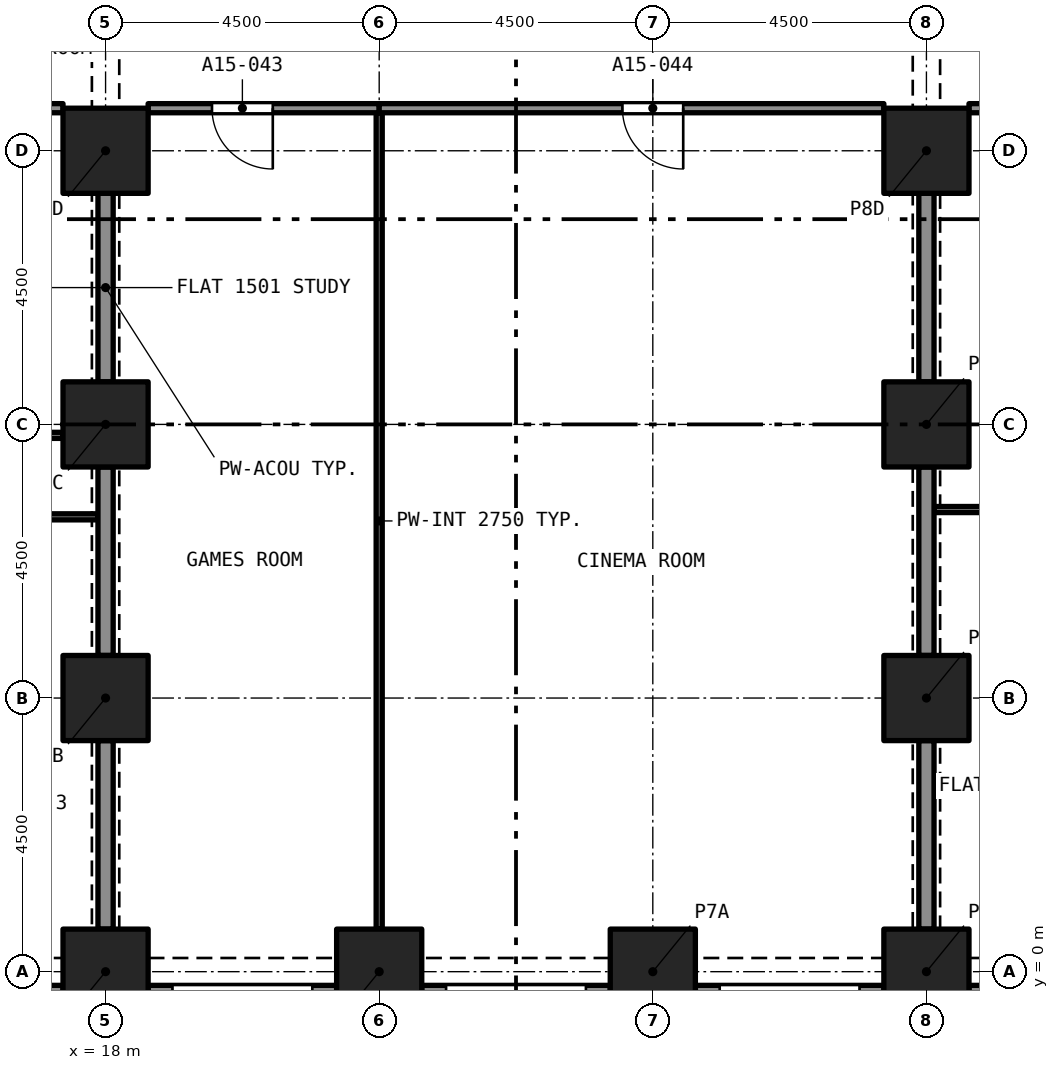
"""IFC4 building model, lengths in metres.
Left out: names, types, materials, properties, quantities, classifications, styles, units other than length and angle.
Written with IfcOpenShell. Run it as: python <this file> out.ifc"""

import sys

from ifc_helpers import new_model, si_unit, direction, frame, frame_2d, origin, origin_2d, place, context, subcontext, project, spatial, rectangle, extrude, element, fill, save


model = new_model("IFC4")
c1 = context("Model", 3, precision=1e-05, world=origin(), true_north=direction((0.0, 1.0)))
c2 = subcontext(c1, "Body", "Model", "MODEL_VIEW")
j1 = project(units=[si_unit("LENGTHUNIT", "METRE"), si_unit("PLANEANGLEUNIT", "RADIAN")], contexts=[c1])
p1 = place(None, origin())
s1 = spatial("IfcSite", under=j1, at=p1, CompositionType="ELEMENT")
p2 = place(p1, origin())
s2 = spatial("IfcBuilding", under=s1, at=p2, CompositionType="ELEMENT")
p3 = place(p2, frame((0.0, 0.0, 59.2)))
s3 = spatial("IfcBuildingStorey", under=s2, at=p3, CompositionType="ELEMENT", Elevation=59.2)
for number, where, z_axis, x_axis in (
    (1, (18.0, 0.0, 0.0), (0.0, 0.0, 1.0), (1.0, 0.0, 0.0)),
    (2, (22.5, 0.0, 0.0), (0.0, 0.0, 1.0), (1.0, 0.0, 0.0)),
    (3, (27.0, 0.0, 0.0), (0.0, 0.0, 1.0), (1.0, 0.0, 0.0)),
    (4, (31.5, 0.0, 0.0), (0.0, 0.0, 1.0), (1.0, 0.0, 0.0)),
    (5, (18.0, 4.5, 0.0), (0.0, 0.0, 1.0), (1.0, 0.0, 0.0)),
    (6, (31.5, 4.5, 0.0), (0.0, 0.0, 1.0), (1.0, 0.0, 0.0)),
    (7, (18.0, 9.0, 0.0), (0.0, 0.0, 1.0), (1.0, 0.0, 0.0)),
    (8, (31.5, 9.0, 0.0), (0.0, 0.0, 1.0), (1.0, 0.0, 0.0)),
    (9, (18.0, 13.5, 0.0), (0.0, 0.0, 1.0), (1.0, 0.0, 0.0)),
    (10, (31.5, 13.5, 0.0), (0.0, 0.0, 1.0), (1.0, 0.0, 0.0)),
):
    element("IfcColumn", number, at=place(p3, frame(where, z_axis=z_axis, x_axis=x_axis)), inside=s3, PredefinedType="COLUMN", context=c2, shape_type="SweptSolid", body=[
        extrude(rectangle(XDim=1.4, YDim=1.4, at=origin_2d()), origin(), (0.0, 0.0, 1.0), 3.2),
    ])
p4 = place(p3, frame((17.3, -0.375, 0.0), z_axis=(0.0, 0.0, 1.0), x_axis=(-1.0, 0.0, 0.0)))
e11 = element("IfcWall", 11, at=p4, inside=s3, PredefinedType="SOLIDWALL", context=c2, shape_type="SweptSolid", body=[
    extrude(rectangle(XDim=3.1, YDim=0.3, at=frame_2d((1.55, 0.0))), origin(), (0.0, 0.0, 1.0), 3.2),
])
p5 = place(p4, frame((0.4, 0.0, 0.45)))
e12 = element("IfcOpeningElement", 12, at=p5, cuts=e11, PredefinedType="OPENING", context=c2, shape_type="SweptSolid", body=[
    extrude(rectangle(XDim=2.3, YDim=1.95, at=frame_2d((1.15, 0.975))), frame((0.0, 0.16, 0.0), z_axis=(0.0, -1.0, 0.0), x_axis=(1.0, 0.0, 0.0)), (0.0, 0.0, 1.0), 0.32),
])
p6 = place(p3, frame((21.8, -0.375, 0.0), z_axis=(0.0, 0.0, 1.0), x_axis=(-1.0, 0.0, 0.0)))
e13 = element("IfcWall", 13, at=p6, inside=s3, PredefinedType="SOLIDWALL", context=c2, shape_type="SweptSolid", body=[
    extrude(rectangle(XDim=3.1, YDim=0.3, at=frame_2d((1.55, 0.0))), origin(), (0.0, 0.0, 1.0), 3.2),
])
p7 = place(p6, frame((0.4, 0.0, 0.45)))
e14 = element("IfcOpeningElement", 14, at=p7, cuts=e13, PredefinedType="OPENING", context=c2, shape_type="SweptSolid", body=[
    extrude(rectangle(XDim=2.3, YDim=1.95, at=frame_2d((1.15, 0.975))), frame((0.0, 0.16, 0.0), z_axis=(0.0, -1.0, 0.0), x_axis=(1.0, 0.0, 0.0)), (0.0, 0.0, 1.0), 0.32),
])
p8 = place(p3, frame((26.3, -0.375, 0.0), z_axis=(0.0, 0.0, 1.0), x_axis=(-1.0, 0.0, 0.0)))
e15 = element("IfcWall", 15, at=p8, inside=s3, PredefinedType="SOLIDWALL", context=c2, shape_type="SweptSolid", body=[
    extrude(rectangle(XDim=3.1, YDim=0.3, at=frame_2d((1.55, 0.0))), origin(), (0.0, 0.0, 1.0), 3.2),
])
p9 = place(p8, frame((0.4, 0.0, 0.45)))
e16 = element("IfcOpeningElement", 16, at=p9, cuts=e15, PredefinedType="OPENING", context=c2, shape_type="SweptSolid", body=[
    extrude(rectangle(XDim=2.3, YDim=1.95, at=frame_2d((1.15, 0.975))), frame((0.0, 0.16, 0.0), z_axis=(0.0, -1.0, 0.0), x_axis=(1.0, 0.0, 0.0)), (0.0, 0.0, 1.0), 0.32),
])
p10 = place(p3, frame((30.8, -0.375, 0.0), z_axis=(0.0, 0.0, 1.0), x_axis=(-1.0, 0.0, 0.0)))
e17 = element("IfcWall", 17, at=p10, inside=s3, PredefinedType="SOLIDWALL", context=c2, shape_type="SweptSolid", body=[
    extrude(rectangle(XDim=3.1, YDim=0.3, at=frame_2d((1.55, 0.0))), origin(), (0.0, 0.0, 1.0), 3.2),
])
p11 = place(p10, frame((0.4, 0.0, 0.45)))
e18 = element("IfcOpeningElement", 18, at=p11, cuts=e17, PredefinedType="OPENING", context=c2, shape_type="SweptSolid", body=[
    extrude(rectangle(XDim=2.3, YDim=1.95, at=frame_2d((1.15, 0.975))), frame((0.0, 0.16, 0.0), z_axis=(0.0, -1.0, 0.0), x_axis=(1.0, 0.0, 0.0)), (0.0, 0.0, 1.0), 0.32),
])
p12 = place(p3, frame((35.3, -0.375, 0.0), z_axis=(0.0, 0.0, 1.0), x_axis=(-1.0, 0.0, 0.0)))
e19 = element("IfcWall", 19, at=p12, inside=s3, PredefinedType="SOLIDWALL", context=c2, shape_type="SweptSolid", body=[
    extrude(rectangle(XDim=3.1, YDim=0.3, at=frame_2d((1.55, 0.0))), origin(), (0.0, 0.0, 1.0), 3.2),
])
p13 = place(p12, frame((0.4, 0.0, 0.45)))
e20 = element("IfcOpeningElement", 20, at=p13, cuts=e19, PredefinedType="OPENING", context=c2, shape_type="SweptSolid", body=[
    extrude(rectangle(XDim=2.3, YDim=1.95, at=frame_2d((1.15, 0.975))), frame((0.0, 0.16, 0.0), z_axis=(0.0, -1.0, 0.0), x_axis=(1.0, 0.0, 0.0)), (0.0, 0.0, 1.0), 0.32),
])
p14 = place(p3, frame((8.55, 14.2, 0.0), z_axis=(0.0, 0.0, 1.0), x_axis=(1.0, 0.0, 0.0)))
e21 = element("IfcWall", 21, at=p14, inside=s3, PredefinedType="PARTITIONING", context=c2, shape_type="SweptSolid", body=[
    extrude(rectangle(XDim=8.75, YDim=0.15, at=frame_2d((4.375, 0.0))), origin(), (0.0, 0.0, 1.0), 2.9),
])
p15 = place(p3, frame((17.875, 7.48, 0.0), z_axis=(0.0, 0.0, 1.0), x_axis=(-1.0, 0.0, 0.0)))
e22 = element("IfcWall", 22, at=p15, inside=s3, PredefinedType="PARTITIONING", context=c2, shape_type="SweptSolid", body=[
    extrude(rectangle(XDim=4.375, YDim=0.1, at=frame_2d((2.188, 0.0))), origin(), (0.0, 0.0, 1.0), 2.9),
])
p16 = place(p15, frame((1.675, 0.0, 0.0)))
e23 = element("IfcOpeningElement", 23, at=p16, cuts=e22, PredefinedType="OPENING", context=c2, shape_type="SweptSolid", body=[
    extrude(rectangle(XDim=0.9, YDim=2.1, at=frame_2d((0.45, 1.05))), frame((0.0, 0.06, 0.0), z_axis=(0.0, -1.0, 0.0), x_axis=(1.0, 0.0, 0.0)), (0.0, 0.0, 1.0), 0.12),
])
for number, where, z_axis, x_axis in (
    (24, (18.0, 5.2, 0.0), (0.0, 0.0, 1.0), (0.0, 1.0, 0.0)),
    (25, (18.0, 0.7, 0.0), (0.0, 0.0, 1.0), (0.0, 1.0, 0.0)),
):
    element("IfcWall", number, at=place(p3, frame(where, z_axis=z_axis, x_axis=x_axis)), inside=s3, PredefinedType="PARTITIONING", context=c2, shape_type="SweptSolid", body=[
        extrude(rectangle(XDim=3.1, YDim=0.25, at=frame_2d((1.55, 0.0))), origin(), (0.0, 0.0, 1.0), 2.38),
    ])
p17 = place(p3, frame((14.771, 8.82, 0.0), z_axis=(0.0, 0.0, 1.0), x_axis=(1.0, 0.0, 0.0)))
e26 = element("IfcWall", 26, at=p17, inside=s3, PredefinedType="PARTITIONING", context=c2, shape_type="SweptSolid", body=[
    extrude(rectangle(XDim=2.529, YDim=0.1, at=frame_2d((1.265, 0.0))), origin(), (0.0, 0.0, 1.0), 2.9),
])
p18 = place(p17, frame((1.165, 0.0, 0.0)))
e27 = element("IfcOpeningElement", 27, at=p18, cuts=e26, PredefinedType="OPENING", context=c2, shape_type="SweptSolid", body=[
    extrude(rectangle(XDim=0.9, YDim=2.1, at=frame_2d((0.45, 1.05))), frame((0.0, 0.06, 0.0), z_axis=(0.0, -1.0, 0.0), x_axis=(1.0, 0.0, 0.0)), (0.0, 0.0, 1.0), 0.12),
])
p19 = place(p3, frame((18.0, 9.7, 0.0), z_axis=(0.0, 0.0, 1.0), x_axis=(0.0, 1.0, 0.0)))
e28 = element("IfcWall", 28, at=p19, inside=s3, PredefinedType="PARTITIONING", context=c2, shape_type="SweptSolid", body=[
    extrude(rectangle(XDim=3.1, YDim=0.25, at=frame_2d((1.55, 0.0))), origin(), (0.0, 0.0, 1.0), 2.38),
])
p20 = place(p3, frame((36.0, 7.6, 0.0), z_axis=(0.0, 0.0, 1.0), x_axis=(-1.0, 0.0, 0.0)))
e29 = element("IfcWall", 29, at=p20, inside=s3, PredefinedType="PARTITIONING", context=c2, shape_type="SweptSolid", body=[
    extrude(rectangle(XDim=4.375, YDim=0.1, at=frame_2d((2.188, 0.0))), origin(), (0.0, 0.0, 1.0), 2.9),
])
p21 = place(p20, frame((1.75, 0.0, 0.0)))
e30 = element("IfcOpeningElement", 30, at=p21, cuts=e29, PredefinedType="OPENING", context=c2, shape_type="SweptSolid", body=[
    extrude(rectangle(XDim=1.0, YDim=2.1, at=frame_2d((0.5, 1.05))), frame((0.0, 0.06, 0.0), z_axis=(0.0, -1.0, 0.0), x_axis=(1.0, 0.0, 0.0)), (0.0, 0.0, 1.0), 0.12),
])
p22 = place(p3, frame((31.5, 9.7, 0.0), z_axis=(0.0, 0.0, 1.0), x_axis=(0.0, 1.0, 0.0)))
e31 = element("IfcWall", 31, at=p22, inside=s3, PredefinedType="PARTITIONING", context=c2, shape_type="SweptSolid", body=[
    extrude(rectangle(XDim=3.1, YDim=0.25, at=frame_2d((1.55, 0.0))), origin(), (0.0, 0.0, 1.0), 2.38),
])
p23 = place(p3, frame((34.425, 14.2, 0.0), z_axis=(0.0, 0.0, 1.0), x_axis=(-1.0, 0.0, 0.0)))
e32 = element("IfcWall", 32, at=p23, inside=s3, PredefinedType="PARTITIONING", context=c2, shape_type="SweptSolid", body=[
    extrude(rectangle(XDim=2.225, YDim=0.15, at=frame_2d((1.113, 0.0))), origin(), (0.0, 0.0, 1.0), 2.9),
])
p24 = place(p23, frame((0.175, 0.0, 0.0)))
e33 = element("IfcOpeningElement", 33, at=p24, cuts=e32, PredefinedType="OPENING", context=c2, shape_type="SweptSolid", body=[
    extrude(rectangle(XDim=1.0, YDim=2.1, at=frame_2d((0.5, 1.05))), frame((0.0, 0.085, 0.0), z_axis=(0.0, -1.0, 0.0), x_axis=(1.0, 0.0, 0.0)), (0.0, 0.0, 1.0), 0.17),
])
for number, where, z_axis, x_axis in (
    (34, (31.5, 0.7, 0.0), (0.0, 0.0, 1.0), (0.0, 1.0, 0.0)),
    (35, (31.5, 5.2, 0.0), (0.0, 0.0, 1.0), (0.0, 1.0, 0.0)),
):
    element("IfcWall", number, at=place(p3, frame(where, z_axis=z_axis, x_axis=x_axis)), inside=s3, PredefinedType="PARTITIONING", context=c2, shape_type="SweptSolid", body=[
        extrude(rectangle(XDim=3.1, YDim=0.25, at=frame_2d((1.55, 0.0))), origin(), (0.0, 0.0, 1.0), 2.38),
    ])
p25 = place(p3, frame((22.5, 0.7, 0.0), z_axis=(0.0, 0.0, 1.0), x_axis=(0.0, 1.0, 0.0)))
e36 = element("IfcWall", 36, at=p25, inside=s3, PredefinedType="PARTITIONING", context=c2, shape_type="SweptSolid", body=[
    extrude(rectangle(XDim=13.425, YDim=0.1, at=frame_2d((6.712, 0.0))), origin(), (0.0, 0.0, 1.0), 2.75),
])
p26 = place(p3, frame((22.5, 14.2, 0.0), z_axis=(0.0, 0.0, 1.0), x_axis=(-1.0, 0.0, 0.0)))
e37 = element("IfcWall", 37, at=p26, inside=s3, PredefinedType="PARTITIONING", context=c2, shape_type="SweptSolid", body=[
    extrude(rectangle(XDim=3.8, YDim=0.15, at=frame_2d((1.9, 0.0))), origin(), (0.0, 0.0, 1.0), 2.75),
])
p27 = place(p26, frame((1.75, 0.0, 0.0)))
e38 = element("IfcOpeningElement", 38, at=p27, cuts=e37, PredefinedType="OPENING", context=c2, shape_type="SweptSolid", body=[
    extrude(rectangle(XDim=1.0, YDim=2.1, at=frame_2d((0.5, 1.05))), frame((0.0, 0.085, 0.0), z_axis=(0.0, -1.0, 0.0), x_axis=(1.0, 0.0, 0.0)), (0.0, 0.0, 1.0), 0.17),
])
p28 = place(p3, frame((30.8, 14.2, 0.0), z_axis=(0.0, 0.0, 1.0), x_axis=(-1.0, 0.0, 0.0)))
e39 = element("IfcWall", 39, at=p28, inside=s3, PredefinedType="PARTITIONING", context=c2, shape_type="SweptSolid", body=[
    extrude(rectangle(XDim=8.3, YDim=0.15, at=frame_2d((4.15, 0.0))), origin(), (0.0, 0.0, 1.0), 2.75),
])
p29 = place(p28, frame((3.3, 0.0, 0.0)))
e40 = element("IfcOpeningElement", 40, at=p29, cuts=e39, PredefinedType="OPENING", context=c2, shape_type="SweptSolid", body=[
    extrude(rectangle(XDim=1.0, YDim=2.1, at=frame_2d((0.5, 1.05))), frame((0.0, 0.085, 0.0), z_axis=(0.0, -1.0, 0.0), x_axis=(1.0, 0.0, 0.0)), (0.0, 0.0, 1.0), 0.17),
])
p30 = place(p27, origin())
e41 = element("IfcDoor", 41, at=p30, inside=s3, OperationType="SINGLE_SWING_RIGHT", PredefinedType="DOOR", context=c2, shape_type="SweptSolid", body=[
    extrude(rectangle(XDim=1.0, YDim=2.1, at=frame_2d((0.5, 1.05))), frame((0.0, 0.025, 0.0), z_axis=(0.0, -1.0, 0.0), x_axis=(1.0, 0.0, 0.0)), (0.0, 0.0, 1.0), 0.05),
])
fill(e38, e41)
p31 = place(p29, origin())
e42 = element("IfcDoor", 42, at=p31, inside=s3, OperationType="SINGLE_SWING_LEFT", PredefinedType="DOOR", context=c2, shape_type="SweptSolid", body=[
    extrude(rectangle(XDim=1.0, YDim=2.1, at=frame_2d((0.5, 1.05))), frame((0.0, 0.025, 0.0), z_axis=(0.0, -1.0, 0.0), x_axis=(1.0, 0.0, 0.0)), (0.0, 0.0, 1.0), 0.05),
])
fill(e40, e42)
save(model, sys.argv[1])
